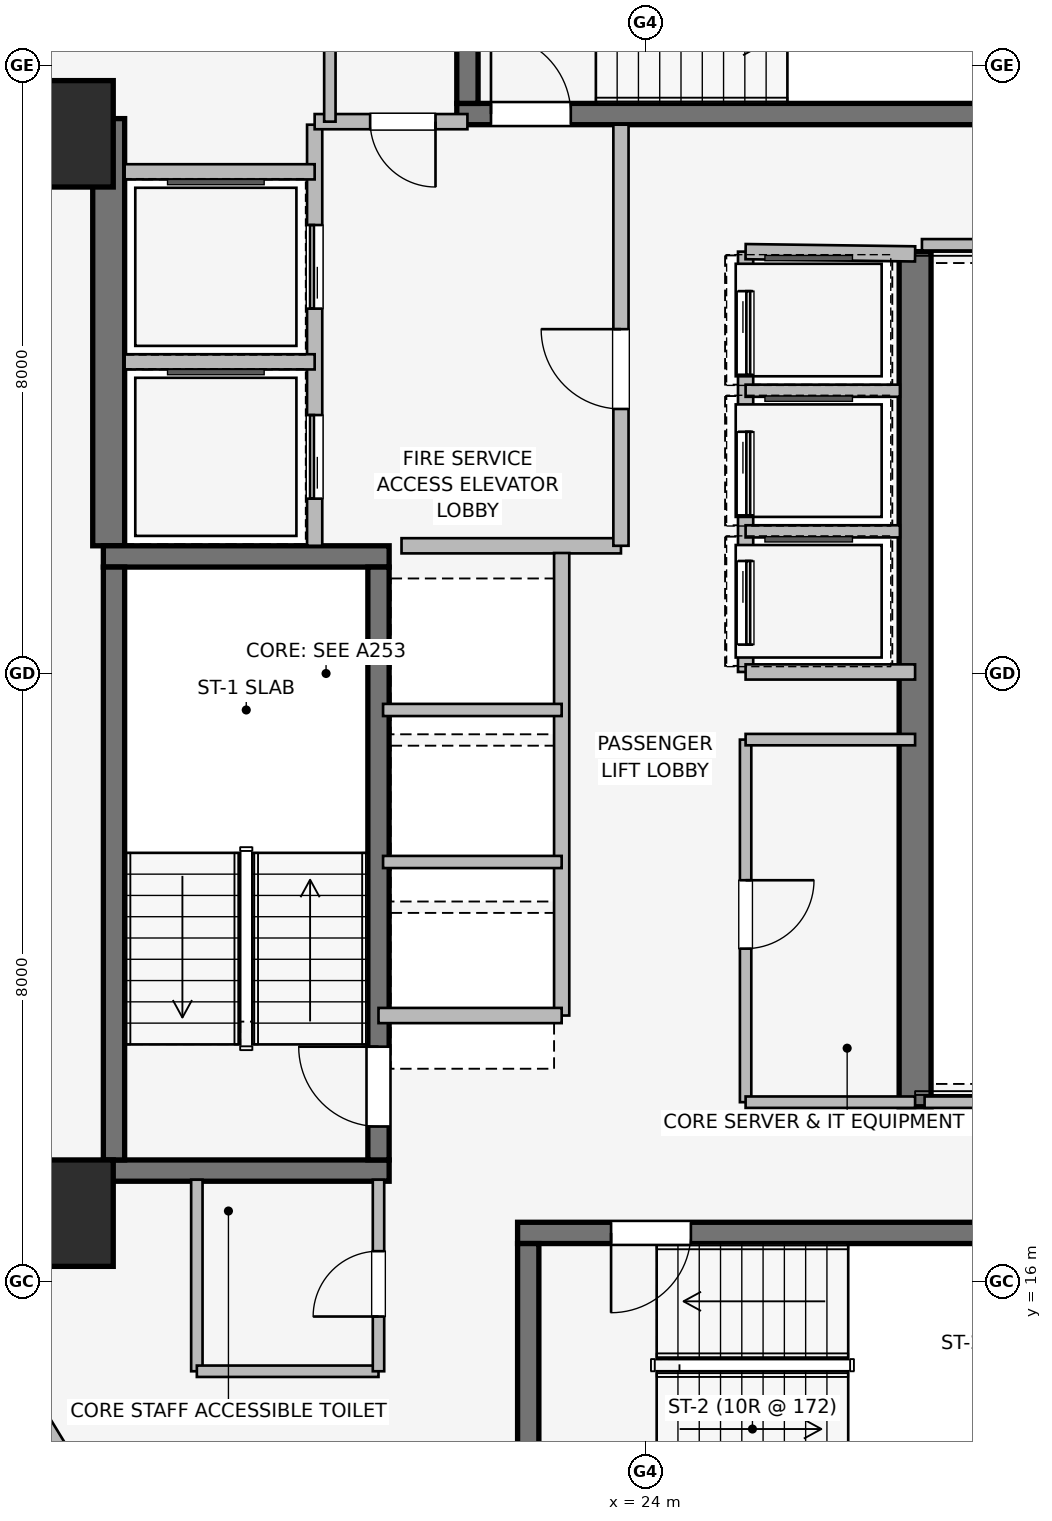
"""IFC4 building model, lengths in metres.
Left out: names, types, materials, properties, quantities, classifications, styles, units other than length and angle.
Written with IfcOpenShell. Run it as: python <this file> out.ifc"""

import sys

from ifc_helpers import new_model, si_unit, direction, frame, frame_2d, origin, origin_2d, place, context, subcontext, project, spatial, rectangle, extrude, element, fill, save


model = new_model("IFC4")
c1 = context("Model", 3, precision=1e-05, world=origin(), true_north=direction((0.0, 1.0)))
c2 = subcontext(c1, "Body", "Model", "MODEL_VIEW")
j1 = project(units=[si_unit("LENGTHUNIT", "METRE"), si_unit("PLANEANGLEUNIT", "RADIAN")], contexts=[c1])
p1 = place(None, origin())
s1 = spatial("IfcSite", under=j1, at=p1, CompositionType="ELEMENT")
p2 = place(p1, origin())
s2 = spatial("IfcBuilding", under=s1, at=p2, CompositionType="ELEMENT")
p3 = place(p2, frame((0.0, 0.0, 187.8)))
s3 = spatial("IfcBuildingStorey", under=s2, at=p3, CompositionType="ELEMENT", Elevation=187.8)
p4 = place(p3, frame((16.94, 25.68, 0.0), z_axis=(0.0, 0.0, 1.0), x_axis=(0.0, 1.0, 0.0)))
e1 = element("IfcWall", 1, at=p4, inside=s3, PredefinedType="SHEAR", context=c2, shape_type="SweptSolid", body=[
    extrude(rectangle(XDim=5.62, YDim=0.42, at=frame_2d((2.81, 0.0))), origin(), (0.0, 0.0, 1.0), 3.45),
])
p5 = place(p3, frame((27.55, 29.55, 0.0), z_axis=(0.0, 0.0, 1.0), x_axis=(0.0, -1.0, 0.0)))
e2 = element("IfcWall", 2, at=p5, inside=s3, PredefinedType="SHEAR", context=c2, shape_type="SweptSolid", body=[
    extrude(rectangle(XDim=11.25, YDim=0.42, at=frame_2d((5.625, 0.0))), origin(), (0.0, 0.0, 1.0), 3.45),
])
for number, where, z_axis, x_axis in (
    (3, (16.87, 17.46, 0.0), (0.0, 0.0, 1.0), (1.0, 0.0, 0.0)),
    (4, (20.63, 25.54, 0.0), (0.0, 0.0, 1.0), (-1.0, 0.0, 0.0)),
):
    element("IfcWall", number, at=place(p3, frame(where, z_axis=z_axis, x_axis=x_axis)), inside=s3, PredefinedType="SHEAR", context=c2, shape_type="SweptSolid", body=[
        extrude(rectangle(XDim=3.76, YDim=0.28, at=frame_2d((1.88, 0.0))), origin(), (0.0, 0.0, 1.0), 3.45),
    ])
p6 = place(p3, frame((17.01, 25.4, 0.0), z_axis=(0.0, 0.0, 1.0), x_axis=(0.0, -1.0, 0.0)))
e5 = element("IfcWall", 5, at=p6, inside=s3, PredefinedType="SHEAR", context=c2, shape_type="SweptSolid", body=[
    extrude(rectangle(XDim=7.8, YDim=0.28, at=frame_2d((3.9, 0.0))), origin(), (0.0, 0.0, 1.0), 3.45),
])
p7 = place(p3, frame((20.49, 17.6, 0.0), z_axis=(0.0, 0.0, 1.0), x_axis=(0.0, 1.0, 0.0)))
e6 = element("IfcWall", 6, at=p7, inside=s3, PredefinedType="SHEAR", context=c2, shape_type="SweptSolid", body=[
    extrude(rectangle(XDim=7.8, YDim=0.28, at=frame_2d((3.9, 0.0))), origin(), (0.0, 0.0, 1.0), 3.45),
])
p8 = place(p7, frame((0.44, 0.0, 0.0)))
e7 = element("IfcOpeningElement", 7, at=p8, cuts=e6, PredefinedType="OPENING", context=c2, shape_type="SweptSolid", body=[
    extrude(rectangle(XDim=1.05, YDim=2.0, at=frame_2d((0.525, 1.0))), frame((0.0, 0.15, 0.0), z_axis=(0.0, -1.0, 0.0), x_axis=(1.0, 0.0, 0.0)), (0.0, 0.0, 1.0), 0.3),
])
p9 = place(p3, frame((30.68, 16.64, 0.0), z_axis=(0.0, 0.0, 1.0), x_axis=(-1.0, 0.0, 0.0)))
e8 = element("IfcWall", 8, at=p9, inside=s3, PredefinedType="SHEAR", context=c2, shape_type="SweptSolid", body=[
    extrude(rectangle(XDim=8.36, YDim=0.28, at=frame_2d((4.18, 0.0))), origin(), (0.0, 0.0, 1.0), 3.45),
])
p10 = place(p9, frame((6.08, 0.0, 0.0)))
e9 = element("IfcOpeningElement", 9, at=p10, cuts=e8, PredefinedType="OPENING", context=c2, shape_type="SweptSolid", body=[
    extrude(rectangle(XDim=1.05, YDim=2.0, at=frame_2d((0.525, 1.0))), frame((0.0, 0.15, 0.0), z_axis=(0.0, -1.0, 0.0), x_axis=(1.0, 0.0, 0.0)), (0.0, 0.0, 1.0), 0.3),
])
p11 = place(p3, frame((22.46, 16.5, 0.0), z_axis=(0.0, 0.0, 1.0), x_axis=(0.0, -1.0, 0.0)))
e10 = element("IfcWall", 10, at=p11, inside=s3, PredefinedType="SHEAR", context=c2, shape_type="SweptSolid", body=[
    extrude(rectangle(XDim=3.2, YDim=0.28, at=frame_2d((1.6, 0.0))), origin(), (0.0, 0.0, 1.0), 3.45),
])
p12 = place(p3, frame((21.52, 31.36, 0.0), z_axis=(0.0, 0.0, 1.0), x_axis=(1.0, 0.0, 0.0)))
e11 = element("IfcWall", 11, at=p12, inside=s3, PredefinedType="SHEAR", context=c2, shape_type="SweptSolid", body=[
    extrude(rectangle(XDim=8.36, YDim=0.28, at=frame_2d((4.18, 0.0))), origin(), (0.0, 0.0, 1.0), 3.45),
])
p13 = place(p12, frame((0.45, 0.0, 0.0)))
e12 = element("IfcOpeningElement", 12, at=p13, cuts=e11, PredefinedType="OPENING", context=c2, shape_type="SweptSolid", body=[
    extrude(rectangle(XDim=1.05, YDim=2.0, at=frame_2d((0.525, 1.0))), frame((0.0, 0.15, 0.0), z_axis=(0.0, -1.0, 0.0), x_axis=(1.0, 0.0, 0.0)), (0.0, 0.0, 1.0), 0.3),
])
p14 = place(p3, frame((21.66, 34.7, 0.0), z_axis=(0.0, 0.0, 1.0), x_axis=(0.0, -1.0, 0.0)))
e13 = element("IfcWall", 13, at=p14, inside=s3, PredefinedType="SHEAR", context=c2, shape_type="SweptSolid", body=[
    extrude(rectangle(XDim=3.2, YDim=0.28, at=frame_2d((1.6, 0.0))), origin(), (0.0, 0.0, 1.0), 3.45),
])
for number, where, z_axis, x_axis in (
    (14, (16.3, 16.9, 0.0), (0.0, 0.0, 1.0), (1.0, 0.0, 0.0)),
    (15, (16.3, 31.1, 0.0), (0.0, 0.0, 1.0), (1.0, 0.0, 0.0)),
):
    element("IfcColumn", number, at=place(p3, frame(where, z_axis=z_axis, x_axis=x_axis)), inside=s3, PredefinedType="COLUMN", context=c2, shape_type="SweptSolid", body=[
        extrude(rectangle(XDim=1.4, YDim=1.4, at=origin_2d()), origin(), (0.0, 0.0, 1.0), 3.45),
    ])
p15 = place(p3, frame((17.489, 12.8, 0.0), z_axis=(0.0, 0.0, 1.0), x_axis=(-0.791409877269, 0.611285862884, 0.0)))
e16 = element("IfcWall", 16, at=p15, inside=s3, PredefinedType="STANDARD", context=c2, shape_type="SweptSolid", body=[
    extrude(rectangle(XDim=1.677, YDim=0.33, at=frame_2d((0.838, 0.0))), origin(), (0.0, 0.0, 1.0), 3.14),
])
p16 = place(p3, frame((16.288, 13.685, 0.0), z_axis=(0.0, 0.0, 1.0), x_axis=(-0.520325409202, 0.853968072318, 0.0)))
e17 = element("IfcWall", 17, at=p16, inside=s3, PredefinedType="STANDARD", context=c2, shape_type="SweptSolid", body=[
    extrude(rectangle(XDim=1.678, YDim=0.33, at=frame_2d((0.839, 0.0))), origin(), (0.0, 0.0, 1.0), 3.14),
])
p17 = place(p3, frame((19.65, 25.68, 0.0), z_axis=(0.0, 0.0, 1.0), x_axis=(0.0, 1.0, 0.0)))
e18 = element("IfcWall", 18, at=p17, inside=s3, PredefinedType="PARTITIONING", context=c2, shape_type="SweptSolid", body=[
    extrude(rectangle(XDim=5.54, YDim=0.2, at=frame_2d((2.77, 0.0))), origin(), (0.0, 0.0, 1.0), 3.14),
])
p18 = place(p17, frame((0.62, 0.0, 0.0)))
e19 = element("IfcOpeningElement", 19, at=p18, cuts=e18, PredefinedType="OPENING", context=c2, shape_type="SweptSolid", body=[
    extrude(rectangle(XDim=1.1, YDim=2.2, at=frame_2d((0.55, 1.1))), frame((0.0, 0.11, 0.0), z_axis=(0.0, -1.0, 0.0), x_axis=(1.0, 0.0, 0.0)), (0.0, 0.0, 1.0), 0.22),
])
p19 = place(p17, frame((3.12, 0.0, 0.0)))
e20 = element("IfcOpeningElement", 20, at=p19, cuts=e18, PredefinedType="OPENING", context=c2, shape_type="SweptSolid", body=[
    extrude(rectangle(XDim=1.1, YDim=2.2, at=frame_2d((0.55, 1.1))), frame((0.0, 0.11, 0.0), z_axis=(0.0, -1.0, 0.0), x_axis=(1.0, 0.0, 0.0)), (0.0, 0.0, 1.0), 0.22),
])
p20 = place(p3, frame((20.793, 25.68, 0.0), z_axis=(0.0, 0.0, 1.0), x_axis=(1.0, 0.0, 0.0)))
e21 = element("IfcWall", 21, at=p20, inside=s3, PredefinedType="PARTITIONING", context=c2, shape_type="SweptSolid", body=[
    extrude(rectangle(XDim=2.887, YDim=0.2, at=frame_2d((1.443, 0.0))), origin(), (0.0, 0.0, 1.0), 3.14),
])
p21 = place(p3, frame((23.68, 25.68, 0.0), z_axis=(0.0, 0.0, 1.0), x_axis=(0.0, 1.0, 0.0)))
e22 = element("IfcWall", 22, at=p21, inside=s3, PredefinedType="PARTITIONING", context=c2, shape_type="SweptSolid", body=[
    extrude(rectangle(XDim=5.54, YDim=0.2, at=frame_2d((2.77, 0.0))), origin(), (0.0, 0.0, 1.0), 3.14),
])
p22 = place(p21, frame((1.8, 0.0, 0.0)))
e23 = element("IfcOpeningElement", 23, at=p22, cuts=e22, PredefinedType="OPENING", context=c2, shape_type="SweptSolid", body=[
    extrude(rectangle(XDim=1.05, YDim=2.0, at=frame_2d((0.525, 1.0))), frame((0.0, 0.11, 0.0), z_axis=(0.0, -1.0, 0.0), x_axis=(1.0, 0.0, 0.0)), (0.0, 0.0, 1.0), 0.22),
])
p23 = place(p3, frame((21.66, 31.26, 0.0), z_axis=(0.0, 0.0, 1.0), x_axis=(-1.0, 0.0, 0.0)))
e24 = element("IfcWall", 24, at=p23, inside=s3, PredefinedType="PARTITIONING", context=c2, shape_type="SweptSolid", body=[
    extrude(rectangle(XDim=2.01, YDim=0.2, at=frame_2d((1.005, 0.0))), origin(), (0.0, 0.0, 1.0), 3.14),
])
p24 = place(p23, frame((0.42, 0.0, 0.0)))
e25 = element("IfcOpeningElement", 25, at=p24, cuts=e24, PredefinedType="OPENING", context=c2, shape_type="SweptSolid", body=[
    extrude(rectangle(XDim=0.86, YDim=2.0, at=frame_2d((0.43, 1.0))), frame((0.0, 0.11, 0.0), z_axis=(0.0, -1.0, 0.0), x_axis=(1.0, 0.0, 0.0)), (0.0, 0.0, 1.0), 0.22),
])
p25 = place(p3, frame((17.15, 28.1, 0.0), z_axis=(0.0, 0.0, 1.0), x_axis=(1.0, 0.0, 0.0)))
e26 = element("IfcWall", 26, at=p25, inside=s3, PredefinedType="PARTITIONING", context=c2, shape_type="SweptSolid", body=[
    extrude(rectangle(XDim=2.5, YDim=0.2, at=frame_2d((1.25, 0.0))), origin(), (0.0, 0.0, 1.0), 3.14),
])
p26 = place(p3, frame((19.65, 30.6, 0.0), z_axis=(0.0, 0.0, 1.0), x_axis=(-1.0, 0.0, 0.0)))
e27 = element("IfcWall", 27, at=p26, inside=s3, PredefinedType="PARTITIONING", context=c2, shape_type="SweptSolid", body=[
    extrude(rectangle(XDim=2.5, YDim=0.2, at=frame_2d((1.25, 0.0))), origin(), (0.0, 0.0, 1.0), 2.04),
])
p27 = place(p3, frame((22.9, 19.5, 0.0), z_axis=(0.0, 0.0, 1.0), x_axis=(0.0, 1.0, 0.0)))
e28 = element("IfcWall", 28, at=p27, inside=s3, PredefinedType="PARTITIONING", context=c2, shape_type="SweptSolid", body=[
    extrude(rectangle(XDim=6.085, YDim=0.2, at=frame_2d((3.042, 0.0))), origin(), (0.0, 0.0, 1.0), 3.14),
])
p28 = place(p3, frame((20.49, 19.5, 0.0), z_axis=(0.0, 0.0, 1.0), x_axis=(1.0, 0.0, 0.0)))
e29 = element("IfcWall", 29, at=p28, inside=s3, PredefinedType="PARTITIONING", context=c2, shape_type="SweptSolid", body=[
    extrude(rectangle(XDim=2.41, YDim=0.2, at=frame_2d((1.205, 0.0))), origin(), (0.0, 0.0, 1.0), 2.04),
])
for number, where, z_axis, x_axis in (
    (30, (20.55, 21.52, 0.0), (0.0, 0.0, 1.0), (1.0, 0.0, 0.0)),
    (31, (20.55, 23.52, 0.0), (0.0, 0.0, 1.0), (1.0, 0.0, 0.0)),
):
    element("IfcWall", number, at=place(p3, frame(where, z_axis=z_axis, x_axis=x_axis)), inside=s3, PredefinedType="PARTITIONING", context=c2, shape_type="SweptSolid", body=[
        extrude(rectangle(XDim=2.35, YDim=0.16, at=frame_2d((1.175, 0.0))), origin(), (0.0, 0.0, 1.0), 3.14),
    ])
p29 = place(p3, frame((25.32, 29.55, 0.0), z_axis=(0.0, 0.0, 1.0), x_axis=(0.0, -1.0, 0.0)))
e32 = element("IfcWall", 32, at=p29, inside=s3, PredefinedType="PARTITIONING", context=c2, shape_type="SweptSolid", body=[
    extrude(rectangle(XDim=5.53, YDim=0.2, at=frame_2d((2.765, 0.0))), origin(), (0.0, 0.0, 1.0), 3.14),
])
p30 = place(p29, frame((0.52, 0.0, 0.0)))
e33 = element("IfcOpeningElement", 33, at=p30, cuts=e32, PredefinedType="OPENING", context=c2, shape_type="SweptSolid", body=[
    extrude(rectangle(XDim=1.1, YDim=2.2, at=frame_2d((0.55, 1.1))), frame((0.0, 0.11, 0.0), z_axis=(0.0, -1.0, 0.0), x_axis=(1.0, 0.0, 0.0)), (0.0, 0.0, 1.0), 0.22),
])
p31 = place(p29, frame((2.37, 0.0, 0.0)))
e34 = element("IfcOpeningElement", 34, at=p31, cuts=e32, PredefinedType="OPENING", context=c2, shape_type="SweptSolid", body=[
    extrude(rectangle(XDim=1.1, YDim=2.2, at=frame_2d((0.55, 1.1))), frame((0.0, 0.11, 0.0), z_axis=(0.0, -1.0, 0.0), x_axis=(1.0, 0.0, 0.0)), (0.0, 0.0, 1.0), 0.22),
])
p32 = place(p29, frame((4.07, 0.0, 0.0)))
e35 = element("IfcOpeningElement", 35, at=p32, cuts=e32, PredefinedType="OPENING", context=c2, shape_type="SweptSolid", body=[
    extrude(rectangle(XDim=1.1, YDim=2.2, at=frame_2d((0.55, 1.1))), frame((0.0, 0.11, 0.0), z_axis=(0.0, -1.0, 0.0), x_axis=(1.0, 0.0, 0.0)), (0.0, 0.0, 1.0), 0.22),
])
p33 = place(p3, frame((27.55, 29.52, 0.0), z_axis=(0.0, 0.0, 1.0), x_axis=(-0.999909343457, 0.013464949556, 0.0)))
e36 = element("IfcWall", 36, at=p33, inside=s3, PredefinedType="PARTITIONING", context=c2, shape_type="SweptSolid", body=[
    extrude(rectangle(XDim=2.23, YDim=0.2, at=frame_2d((1.115, 0.0))), origin(), (0.0, 0.0, 1.0), 2.04),
])
p34 = place(p3, frame((25.32, 24.02, 0.0), z_axis=(0.0, 0.0, 1.0), x_axis=(1.0, 0.0, 0.0)))
e37 = element("IfcWall", 37, at=p34, inside=s3, PredefinedType="PARTITIONING", context=c2, shape_type="SweptSolid", body=[
    extrude(rectangle(XDim=2.23, YDim=0.2, at=frame_2d((1.115, 0.0))), origin(), (0.0, 0.0, 1.0), 3.14),
])
for number, where, z_axis, x_axis in (
    (38, (25.32, 25.87, 0.0), (0.0, 0.0, 1.0), (1.0, 0.0, 0.0)),
    (39, (25.32, 27.72, 0.0), (0.0, 0.0, 1.0), (1.0, 0.0, 0.0)),
):
    element("IfcWall", number, at=place(p3, frame(where, z_axis=z_axis, x_axis=x_axis)), inside=s3, PredefinedType="PARTITIONING", context=c2, shape_type="SweptSolid", body=[
        extrude(rectangle(XDim=2.03, YDim=0.16, at=frame_2d((1.015, 0.0))), origin(), (0.0, 0.0, 1.0), 3.14),
    ])
p35 = place(p3, frame((25.32, 23.13, 0.0), z_axis=(0.0, 0.0, 1.0), x_axis=(0.0, -1.0, 0.0)))
e40 = element("IfcWall", 40, at=p35, inside=s3, PredefinedType="PARTITIONING", context=c2, shape_type="SweptSolid", body=[
    extrude(rectangle(XDim=4.77, YDim=0.15, at=frame_2d((2.385, 0.0))), origin(), (0.0, 0.0, 1.0), 3.14),
])
p36 = place(p35, frame((1.85, 0.0, 0.0)))
e41 = element("IfcOpeningElement", 41, at=p36, cuts=e40, PredefinedType="OPENING", context=c2, shape_type="SweptSolid", body=[
    extrude(rectangle(XDim=0.9, YDim=2.0, at=frame_2d((0.45, 1.0))), frame((0.0, 0.085, 0.0), z_axis=(0.0, -1.0, 0.0), x_axis=(1.0, 0.0, 0.0)), (0.0, 0.0, 1.0), 0.17),
])
for number, where, z_axis, x_axis in (
    (42, (25.32, 23.13, 0.0), (0.0, 0.0, 1.0), (1.0, 0.0, 0.0)),
    (43, (25.32, 18.36, 0.0), (0.0, 0.0, 1.0), (1.0, 0.0, 0.0)),
):
    element("IfcWall", number, at=place(p3, frame(where, z_axis=z_axis, x_axis=x_axis)), inside=s3, PredefinedType="PARTITIONING", context=c2, shape_type="SweptSolid", body=[
        extrude(rectangle(XDim=2.23, YDim=0.15, at=frame_2d((1.115, 0.0))), origin(), (0.0, 0.0, 1.0), 3.14),
    ])
p37 = place(p3, frame((18.1, 17.34, 0.0), z_axis=(0.0, 0.0, 1.0), x_axis=(0.0, -1.0, 0.0)))
e44 = element("IfcWall", 44, at=p37, inside=s3, PredefinedType="PARTITIONING", context=c2, shape_type="SweptSolid", body=[
    extrude(rectangle(XDim=2.52, YDim=0.15, at=frame_2d((1.26, 0.0))), origin(), (0.0, 0.0, 1.0), 3.14),
])
p38 = place(p3, frame((18.1, 14.82, 0.0), z_axis=(0.0, 0.0, 1.0), x_axis=(1.0, 0.0, 0.0)))
e45 = element("IfcWall", 45, at=p38, inside=s3, PredefinedType="PARTITIONING", context=c2, shape_type="SweptSolid", body=[
    extrude(rectangle(XDim=2.39, YDim=0.15, at=frame_2d((1.195, 0.0))), origin(), (0.0, 0.0, 1.0), 3.14),
])
p39 = place(p3, frame((20.49, 14.82, 0.0), z_axis=(0.0, 0.0, 1.0), x_axis=(0.0, 1.0, 0.0)))
e46 = element("IfcWall", 46, at=p39, inside=s3, PredefinedType="PARTITIONING", context=c2, shape_type="SweptSolid", body=[
    extrude(rectangle(XDim=2.52, YDim=0.15, at=frame_2d((1.26, 0.0))), origin(), (0.0, 0.0, 1.0), 3.14),
])
p40 = place(p39, frame((0.72, 0.0, 0.0)))
e47 = element("IfcOpeningElement", 47, at=p40, cuts=e46, PredefinedType="OPENING", context=c2, shape_type="SweptSolid", body=[
    extrude(rectangle(XDim=0.86, YDim=2.0, at=frame_2d((0.43, 1.0))), frame((0.0, 0.085, 0.0), z_axis=(0.0, -1.0, 0.0), x_axis=(1.0, 0.0, 0.0)), (0.0, 0.0, 1.0), 0.17),
])
p41 = place(p3, frame((19.85, 33.45, 0.0), z_axis=(0.0, 0.0, 1.0), x_axis=(0.0, -1.0, 0.0)))
e48 = element("IfcWall", 48, at=p41, inside=s3, PredefinedType="PARTITIONING", context=c2, shape_type="SweptSolid", body=[
    extrude(rectangle(XDim=2.19, YDim=0.15, at=frame_2d((1.095, 0.0))), origin(), (0.0, 0.0, 1.0), 3.14),
])
p42 = place(p3, frame((27.675, 18.36, 0.0), z_axis=(0.0, 0.0, 1.0), x_axis=(1.0, 0.0, 0.0)))
e49 = element("IfcWall", 49, at=p42, inside=s3, PredefinedType="PARTITIONING", context=c2, shape_type="SweptSolid", body=[
    extrude(rectangle(XDim=12.165, YDim=0.15, at=frame_2d((6.083, 0.0))), origin(), (0.0, 0.0, 1.0), 2.281),
])
p43 = place(p3, frame((39.84, 29.64, 0.0), z_axis=(0.0, 0.0, 1.0), x_axis=(-1.0, 0.0, 0.0)))
e50 = element("IfcWall", 50, at=p43, inside=s3, PredefinedType="PARTITIONING", context=c2, shape_type="SweptSolid", body=[
    extrude(rectangle(XDim=12.2, YDim=0.15, at=frame_2d((6.1, 0.0))), origin(), (0.0, 0.0, 1.0), 2.281),
])
p44 = place(p8, origin())
e51 = element("IfcDoor", 51, at=p44, inside=s3, OperationType="SINGLE_SWING_RIGHT", PredefinedType="DOOR", context=c2, shape_type="SweptSolid", body=[
    extrude(rectangle(XDim=1.05, YDim=2.0, at=frame_2d((0.525, 1.0))), frame((0.0, 0.025, 0.0), z_axis=(0.0, -1.0, 0.0), x_axis=(1.0, 0.0, 0.0)), (0.0, 0.0, 1.0), 0.05),
])
fill(e7, e51)
p45 = place(p10, origin())
e52 = element("IfcDoor", 52, at=p45, inside=s3, OperationType="SINGLE_SWING_RIGHT", PredefinedType="DOOR", context=c2, shape_type="SweptSolid", body=[
    extrude(rectangle(XDim=1.05, YDim=2.0, at=frame_2d((0.525, 1.0))), frame((0.0, 0.025, 0.0), z_axis=(0.0, -1.0, 0.0), x_axis=(1.0, 0.0, 0.0)), (0.0, 0.0, 1.0), 0.05),
])
fill(e9, e52)
p46 = place(p13, origin())
e53 = element("IfcDoor", 53, at=p46, inside=s3, OperationType="SINGLE_SWING_LEFT", PredefinedType="DOOR", context=c2, shape_type="SweptSolid", body=[
    extrude(rectangle(XDim=1.05, YDim=2.0, at=frame_2d((0.525, 1.0))), frame((0.0, 0.025, 0.0), z_axis=(0.0, -1.0, 0.0), x_axis=(1.0, 0.0, 0.0)), (0.0, 0.0, 1.0), 0.05),
])
fill(e12, e53)
p47 = place(p18, origin())
e54 = element("IfcDoor", 54, at=p47, inside=s3, OperationType="SLIDING_TO_LEFT", PredefinedType="DOOR", context=c2, shape_type="SweptSolid", body=[
    extrude(rectangle(XDim=1.1, YDim=2.2, at=frame_2d((0.55, 1.1))), frame((0.0, 0.025, 0.0), z_axis=(0.0, -1.0, 0.0), x_axis=(1.0, 0.0, 0.0)), (0.0, 0.0, 1.0), 0.05),
])
fill(e19, e54)
p48 = place(p19, origin())
e55 = element("IfcDoor", 55, at=p48, inside=s3, OperationType="SLIDING_TO_LEFT", PredefinedType="DOOR", context=c2, shape_type="SweptSolid", body=[
    extrude(rectangle(XDim=1.1, YDim=2.2, at=frame_2d((0.55, 1.1))), frame((0.0, 0.025, 0.0), z_axis=(0.0, -1.0, 0.0), x_axis=(1.0, 0.0, 0.0)), (0.0, 0.0, 1.0), 0.05),
])
fill(e20, e55)
p49 = place(p22, origin())
e56 = element("IfcDoor", 56, at=p49, inside=s3, OperationType="SINGLE_SWING_RIGHT", PredefinedType="DOOR", context=c2, shape_type="SweptSolid", body=[
    extrude(rectangle(XDim=1.05, YDim=2.0, at=frame_2d((0.525, 1.0))), frame((0.0, 0.025, 0.0), z_axis=(0.0, -1.0, 0.0), x_axis=(1.0, 0.0, 0.0)), (0.0, 0.0, 1.0), 0.05),
])
fill(e23, e56)
p50 = place(p24, origin())
e57 = element("IfcDoor", 57, at=p50, inside=s3, OperationType="SINGLE_SWING_LEFT", PredefinedType="DOOR", context=c2, shape_type="SweptSolid", body=[
    extrude(rectangle(XDim=0.86, YDim=2.0, at=frame_2d((0.43, 1.0))), frame((0.0, 0.025, 0.0), z_axis=(0.0, -1.0, 0.0), x_axis=(1.0, 0.0, 0.0)), (0.0, 0.0, 1.0), 0.05),
])
fill(e25, e57)
p51 = place(p30, origin())
e58 = element("IfcDoor", 58, at=p51, inside=s3, OperationType="SLIDING_TO_LEFT", PredefinedType="DOOR", context=c2, shape_type="SweptSolid", body=[
    extrude(rectangle(XDim=1.1, YDim=2.2, at=frame_2d((0.55, 1.1))), frame((0.0, 0.025, 0.0), z_axis=(0.0, -1.0, 0.0), x_axis=(1.0, 0.0, 0.0)), (0.0, 0.0, 1.0), 0.05),
])
fill(e33, e58)
p52 = place(p31, origin())
e59 = element("IfcDoor", 59, at=p52, inside=s3, OperationType="SLIDING_TO_LEFT", PredefinedType="DOOR", context=c2, shape_type="SweptSolid", body=[
    extrude(rectangle(XDim=1.1, YDim=2.2, at=frame_2d((0.55, 1.1))), frame((0.0, 0.025, 0.0), z_axis=(0.0, -1.0, 0.0), x_axis=(1.0, 0.0, 0.0)), (0.0, 0.0, 1.0), 0.05),
])
fill(e34, e59)
p53 = place(p32, origin())
e60 = element("IfcDoor", 60, at=p53, inside=s3, OperationType="SLIDING_TO_LEFT", PredefinedType="DOOR", context=c2, shape_type="SweptSolid", body=[
    extrude(rectangle(XDim=1.1, YDim=2.2, at=frame_2d((0.55, 1.1))), frame((0.0, 0.025, 0.0), z_axis=(0.0, -1.0, 0.0), x_axis=(1.0, 0.0, 0.0)), (0.0, 0.0, 1.0), 0.05),
])
fill(e35, e60)
p54 = place(p36, origin())
e61 = element("IfcDoor", 61, at=p54, inside=s3, OperationType="SINGLE_SWING_LEFT", PredefinedType="DOOR", context=c2, shape_type="SweptSolid", body=[
    extrude(rectangle(XDim=0.9, YDim=2.0, at=frame_2d((0.45, 1.0))), frame((0.0, 0.025, 0.0), z_axis=(0.0, -1.0, 0.0), x_axis=(1.0, 0.0, 0.0)), (0.0, 0.0, 1.0), 0.05),
])
fill(e41, e61)
p55 = place(p40, origin())
e62 = element("IfcDoor", 62, at=p55, inside=s3, OperationType="SINGLE_SWING_LEFT", PredefinedType="DOOR", context=c2, shape_type="SweptSolid", body=[
    extrude(rectangle(XDim=0.86, YDim=2.0, at=frame_2d((0.43, 1.0))), frame((0.0, 0.025, 0.0), z_axis=(0.0, -1.0, 0.0), x_axis=(1.0, 0.0, 0.0)), (0.0, 0.0, 1.0), 0.05),
])
fill(e47, e62)
save(model, sys.argv[1])
